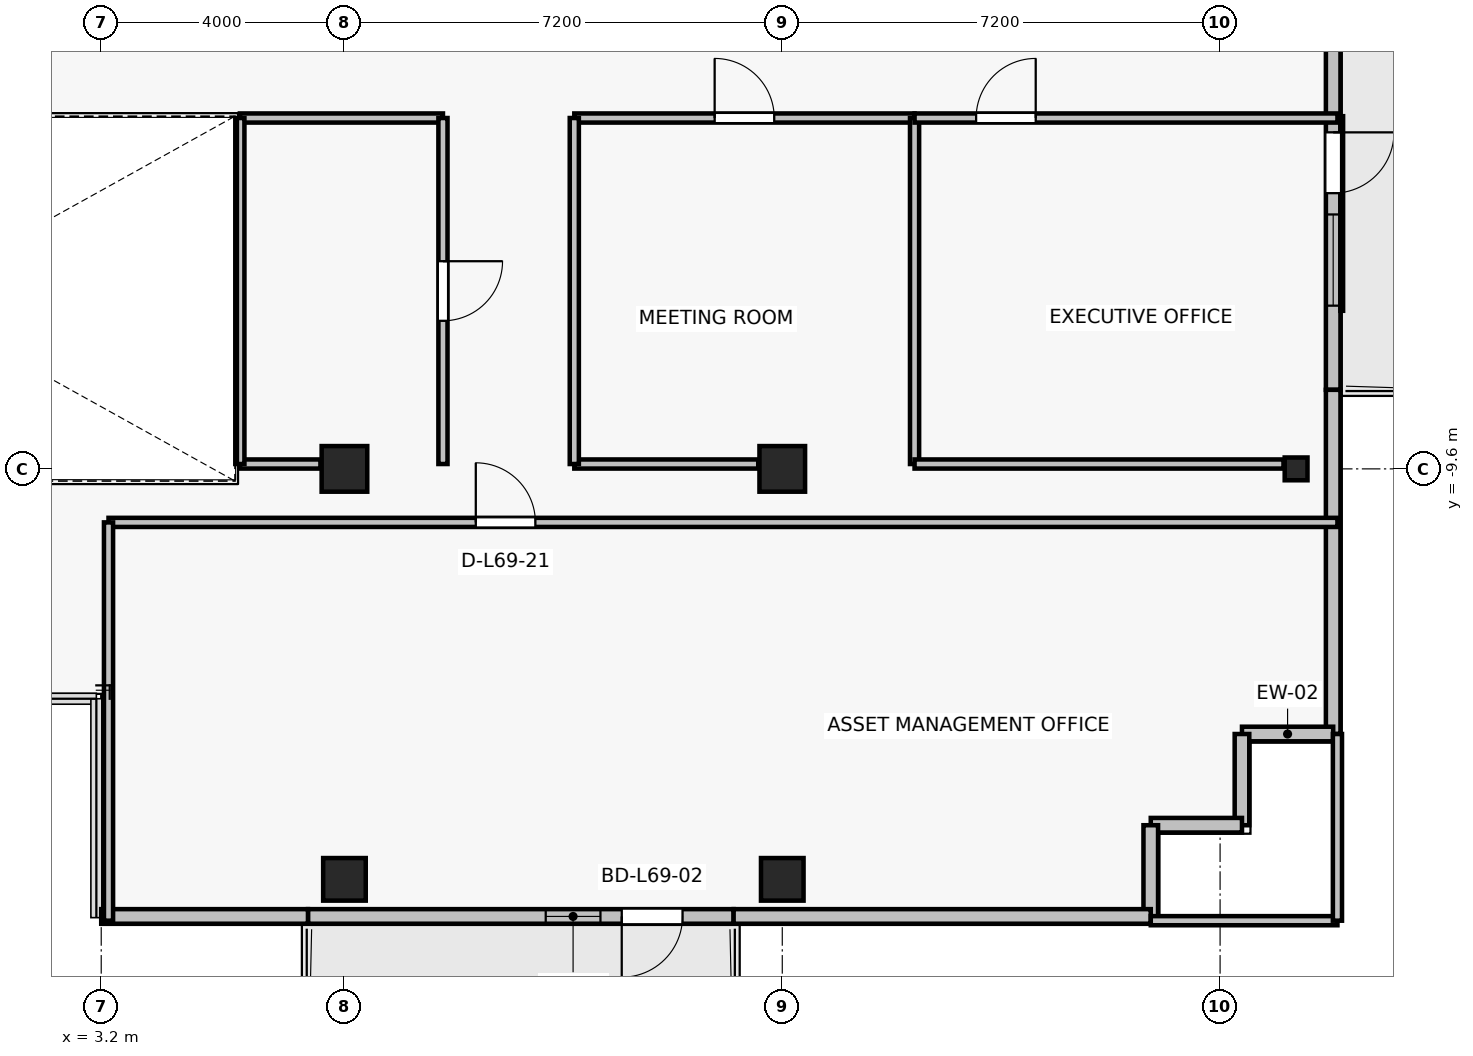
"""IFC4 building model, lengths in metres.
Left out: names, types, materials, properties, quantities, classifications, styles, units other than length and angle.
Written with IfcOpenShell. Run it as: python <this file> out.ifc"""

import sys

from ifc_helpers import new_model, si_unit, direction, frame, frame_2d, origin, origin_2d, place, context, subcontext, project, spatial, rectangle, i_section, extrude, source, transform, mapped, element, fill, save


model = new_model("IFC4")
c1 = context("Model", 3, precision=1e-05, world=origin(), true_north=direction((0.0, 1.0)))
c2 = subcontext(c1, "Body", "Model", "MODEL_VIEW")
j1 = project(units=[si_unit("LENGTHUNIT", "METRE"), si_unit("PLANEANGLEUNIT", "RADIAN")], contexts=[c1])
p1 = place(None, origin())
s1 = spatial("IfcSite", under=j1, at=p1, CompositionType="ELEMENT")
p2 = place(p1, origin())
s2 = spatial("IfcBuilding", under=s1, at=p2, CompositionType="ELEMENT")
p3 = place(p2, frame((0.0, 0.0, 245.2)))
s3 = spatial("IfcBuildingStorey", under=s2, at=p3, CompositionType="ELEMENT", Elevation=245.2)
for number, where, z_axis, x_axis in (
    (1, (7.2, -9.6, 0.0), (0.0, 0.0, 1.0), (1.0, 0.0, 0.0)),
    (2, (14.4, -9.6, 0.0), (0.0, 0.0, 1.0), (1.0, 0.0, 0.0)),
):
    element("IfcColumn", number, at=place(p3, frame(where, z_axis=z_axis, x_axis=x_axis)), inside=s3, PredefinedType="COLUMN", context=c2, shape_type="SweptSolid", body=[
        extrude(rectangle(XDim=0.75, YDim=0.75, at=origin_2d()), origin(), (0.0, 0.0, 1.0), 3.3),
    ])
for number, where, z_axis, x_axis in (
    (3, (7.2, -16.35, 0.0), (0.0, 0.0, 1.0), (1.0, 0.0, 0.0)),
    (4, (14.4, -16.35, 0.0), (0.0, 0.0, 1.0), (1.0, 0.0, 0.0)),
):
    element("IfcColumn", number, at=place(p3, frame(where, z_axis=z_axis, x_axis=x_axis)), inside=s3, PredefinedType="COLUMN", context=c2, shape_type="SweptSolid", body=[
        extrude(rectangle(XDim=0.7, YDim=0.7, at=origin_2d()), origin(), (0.0, 0.0, 1.0), 3.3),
    ])
p4 = place(p3, frame((22.85, -9.6, 0.0), z_axis=(0.0, 0.0, 1.0), x_axis=(1.0, 0.0, 0.0)))
e5 = element("IfcColumn", 5, at=p4, inside=s3, PredefinedType="COLUMN", context=c2, shape_type="SweptSolid", body=[
    extrude(i_section(OverallWidth=0.375, OverallDepth=0.375, WebThickness=0.017, FlangeThickness=0.027, FilletRadius=0.015, at=origin_2d()), origin(), (0.0, 0.0, 1.0), 3.3),
])
p5 = place(p3, frame((13.6, -16.96, 0.0), z_axis=(0.0, 0.0, 1.0), x_axis=(-1.0, 0.0, 0.0)))
e6 = element("IfcWall", 6, at=p5, inside=s3, PredefinedType="SOLIDWALL", context=c2, shape_type="SweptSolid", body=[
    extrude(rectangle(XDim=7.0, YDim=0.24, at=frame_2d((3.5, 0.0))), origin(), (0.0, 0.0, 1.0), 2.665),
])
p6 = place(p5, frame((0.84, 0.0, 0.0)))
e7 = element("IfcOpeningElement", 7, at=p6, cuts=e6, PredefinedType="OPENING", context=c2, shape_type="SweptSolid", body=[
    extrude(rectangle(XDim=1.0, YDim=2.2, at=frame_2d((0.5, 1.1))), frame((0.0, 0.13, 0.0), z_axis=(0.0, -1.0, 0.0), x_axis=(1.0, 0.0, 0.0)), (0.0, 0.0, 1.0), 0.26),
])
p7 = place(p5, frame((2.19, 0.0, 0.85)))
e8 = element("IfcOpeningElement", 8, at=p7, cuts=e6, PredefinedType="OPENING", context=c2, shape_type="SweptSolid", body=[
    extrude(rectangle(XDim=0.9, YDim=1.35, at=frame_2d((0.45, 0.675))), frame((0.0, 0.13, 0.0), z_axis=(0.0, -1.0, 0.0), x_axis=(1.0, 0.0, 0.0)), (0.0, 0.0, 1.0), 0.26),
])
p8 = place(p3, frame((23.46, -2.5, 0.0), z_axis=(0.0, 0.0, 1.0), x_axis=(0.0, -1.0, 0.0)))
e9 = element("IfcWall", 9, at=p8, inside=s3, PredefinedType="SOLIDWALL", context=c2, shape_type="SweptSolid", body=[
    extrude(rectangle(XDim=5.8, YDim=0.24, at=frame_2d((2.9, 0.0))), origin(), (0.0, 0.0, 1.0), 3.075),
])
p9 = place(p8, frame((1.566, 0.0, 0.0)))
e10 = element("IfcOpeningElement", 10, at=p9, cuts=e9, PredefinedType="OPENING", context=c2, shape_type="SweptSolid", body=[
    extrude(rectangle(XDim=1.0, YDim=2.2, at=frame_2d((0.5, 1.1))), frame((0.0, 0.13, 0.0), z_axis=(0.0, -1.0, 0.0), x_axis=(1.0, 0.0, 0.0)), (0.0, 0.0, 1.0), 0.26),
])
p10 = place(p8, frame((2.916, 0.0, 0.85)))
e11 = element("IfcOpeningElement", 11, at=p10, cuts=e9, PredefinedType="OPENING", context=c2, shape_type="SweptSolid", body=[
    extrude(rectangle(XDim=1.5, YDim=1.6, at=frame_2d((0.75, 0.8))), frame((0.0, 0.13, 0.0), z_axis=(0.0, -1.0, 0.0), x_axis=(1.0, 0.0, 0.0)), (0.0, 0.0, 1.0), 0.26),
])
p11 = place(p3, frame((23.46, -13.96, 0.0), z_axis=(0.0, 0.0, 1.0), x_axis=(0.0, 1.0, 0.0)))
e12 = element("IfcWall", 12, at=p11, inside=s3, PredefinedType="SOLIDWALL", context=c2, shape_type="SweptSolid", body=[
    extrude(rectangle(XDim=5.66, YDim=0.24, at=frame_2d((2.83, 0.0))), origin(), (0.0, 0.0, 1.0), 3.075),
])
for number, where, z_axis, x_axis in (
    (13, (21.96, -13.96, 0.0), (0.0, 0.0, 1.0), (1.0, 0.0, 0.0)),
    (14, (21.96, -15.46, 0.0), (0.0, 0.0, 1.0), (0.0, 1.0, 0.0)),
    (15, (20.46, -15.46, 0.0), (0.0, 0.0, 1.0), (1.0, 0.0, 0.0)),
    (16, (20.46, -16.96, 0.0), (0.0, 0.0, 1.0), (0.0, 1.0, 0.0)),
):
    element("IfcWall", number, at=place(p3, frame(where, z_axis=z_axis, x_axis=x_axis)), inside=s3, PredefinedType="SOLIDWALL", context=c2, shape_type="SweptSolid", body=[
        extrude(rectangle(XDim=1.5, YDim=0.24, at=frame_2d((0.75, 0.0))), origin(), (0.0, 0.0, 1.0), 3.075),
    ])
p12 = place(p3, frame((13.6, -16.96, 0.0), z_axis=(0.0, 0.0, 1.0), x_axis=(1.0, 0.0, 0.0)))
e17 = element("IfcWall", 17, at=p12, inside=s3, PredefinedType="SOLIDWALL", context=c2, shape_type="SweptSolid", body=[
    extrude(rectangle(XDim=6.86, YDim=0.24, at=frame_2d((3.43, 0.0))), origin(), (0.0, 0.0, 1.0), 2.665),
])
p13 = place(p3, frame((3.2, -16.96, 0.0), z_axis=(0.0, 0.0, 1.0), x_axis=(1.0, 0.0, 0.0)))
e18 = element("IfcWall", 18, at=p13, inside=s3, PredefinedType="SOLIDWALL", context=c2, shape_type="SweptSolid", body=[
    extrude(rectangle(XDim=3.4, YDim=0.24, at=frame_2d((1.7, 0.0))), origin(), (0.0, 0.0, 1.0), 3.075),
])
p14 = place(p3, frame((14.005, -9.52, 0.0), z_axis=(0.0, 0.0, 1.0), x_axis=(-1.0, 0.0, 0.0)))
e19 = element("IfcWall", 19, at=p14, inside=s3, PredefinedType="PARTITIONING", context=c2, shape_type="SweptSolid", body=[
    extrude(rectangle(XDim=3.025, YDim=0.15, at=frame_2d((1.512, 0.0))), origin(), (0.0, 0.0, 1.0), 2.615),
])
p15 = place(p3, frame((10.98, -3.83, 0.0), z_axis=(0.0, 0.0, 1.0), x_axis=(1.0, 0.0, 0.0)))
e20 = element("IfcWall", 20, at=p15, inside=s3, PredefinedType="PARTITIONING", context=c2, shape_type="SweptSolid", body=[
    extrude(rectangle(XDim=5.596, YDim=0.15, at=frame_2d((2.798, 0.0))), origin(), (0.0, 0.0, 1.0), 2.615),
])
p16 = place(p15, frame((2.308, 0.0, 0.0)))
e21 = element("IfcOpeningElement", 21, at=p16, cuts=e20, PredefinedType="OPENING", context=c2, shape_type="SweptSolid", body=[
    extrude(rectangle(XDim=0.98, YDim=2.15, at=frame_2d((0.49, 1.075))), frame((0.0, 0.085, 0.0), z_axis=(0.0, -1.0, 0.0), x_axis=(1.0, 0.0, 0.0)), (0.0, 0.0, 1.0), 0.17),
])
for number, where, z_axis, x_axis in (
    (22, (10.98, -9.52, 0.0), (0.0, 0.0, 1.0), (0.0, 1.0, 0.0)),
    (23, (16.576, -3.83, 0.0), (0.0, 0.0, 1.0), (0.0, -1.0, 0.0)),
):
    element("IfcWall", number, at=place(p3, frame(where, z_axis=z_axis, x_axis=x_axis)), inside=s3, PredefinedType="PARTITIONING", context=c2, shape_type="SweptSolid", body=[
        extrude(rectangle(XDim=5.69, YDim=0.15, at=frame_2d((2.845, 0.0))), origin(), (0.0, 0.0, 1.0), 2.615),
    ])
p17 = place(p3, frame((22.643, -9.52, 0.0), z_axis=(0.0, 0.0, 1.0), x_axis=(-1.0, 0.0, 0.0)))
e24 = element("IfcWall", 24, at=p17, inside=s3, PredefinedType="PARTITIONING", context=c2, shape_type="SweptSolid", body=[
    extrude(rectangle(XDim=6.067, YDim=0.15, at=frame_2d((3.033, 0.0))), origin(), (0.0, 0.0, 1.0), 2.615),
])
p18 = place(p3, frame((16.576, -3.83, 0.0), z_axis=(0.0, 0.0, 1.0), x_axis=(1.0, 0.0, 0.0)))
e25 = element("IfcWall", 25, at=p18, inside=s3, PredefinedType="PARTITIONING", context=c2, shape_type="SweptSolid", body=[
    extrude(rectangle(XDim=6.954, YDim=0.15, at=frame_2d((3.477, 0.0))), origin(), (0.0, 0.0, 1.0), 2.765),
])
p19 = place(p18, frame((1.012, 0.0, 0.0)))
e26 = element("IfcOpeningElement", 26, at=p19, cuts=e25, PredefinedType="OPENING", context=c2, shape_type="SweptSolid", body=[
    extrude(rectangle(XDim=0.98, YDim=2.15, at=frame_2d((0.49, 1.075))), frame((0.0, 0.085, 0.0), z_axis=(0.0, -1.0, 0.0), x_axis=(1.0, 0.0, 0.0)), (0.0, 0.0, 1.0), 0.17),
])
p20 = place(p3, frame((23.53, -17.03, 0.0), z_axis=(0.0, 0.0, 1.0), x_axis=(-1.0, 0.0, 0.0)))
e27 = element("IfcWall", 27, at=p20, inside=s3, PredefinedType="PARTITIONING", context=c2, shape_type="SweptSolid", body=[
    extrude(rectangle(XDim=3.07, YDim=0.15, at=frame_2d((1.535, 0.0))), origin(), (0.0, 0.0, 1.0), 2.665),
])
p21 = place(p3, frame((3.32, -10.48, 0.0), z_axis=(0.0, 0.0, 1.0), x_axis=(1.0, 0.0, 0.0)))
e28 = element("IfcWall", 28, at=p21, inside=s3, PredefinedType="PARTITIONING", context=c2, shape_type="SweptSolid", body=[
    extrude(rectangle(XDim=20.21, YDim=0.15, at=frame_2d((10.105, 0.0))), origin(), (0.0, 0.0, 1.0), 2.615),
])
p22 = place(p21, frame((6.04, 0.0, 0.0)))
e29 = element("IfcOpeningElement", 29, at=p22, cuts=e28, PredefinedType="OPENING", context=c2, shape_type="SweptSolid", body=[
    extrude(rectangle(XDim=0.98, YDim=2.15, at=frame_2d((0.49, 1.075))), frame((0.0, 0.085, 0.0), z_axis=(0.0, -1.0, 0.0), x_axis=(1.0, 0.0, 0.0)), (0.0, 0.0, 1.0), 0.17),
])
p23 = place(p3, frame((3.32, -17.03, 0.0), z_axis=(0.0, 0.0, 1.0), x_axis=(0.0, 1.0, 0.0)))
e30 = element("IfcWall", 30, at=p23, inside=s3, PredefinedType="PARTITIONING", context=c2, shape_type="SweptSolid", body=[
    extrude(rectangle(XDim=6.55, YDim=0.15, at=frame_2d((3.275, 0.0))), origin(), (0.0, 0.0, 1.0), 2.615),
])
p24 = place(p3, frame((23.53, -13.96, 0.0), z_axis=(0.0, 0.0, 1.0), x_axis=(0.0, -1.0, 0.0)))
e31 = element("IfcWall", 31, at=p24, inside=s3, PredefinedType="PARTITIONING", context=c2, shape_type="SweptSolid", body=[
    extrude(rectangle(XDim=3.07, YDim=0.15, at=frame_2d((1.535, 0.0))), origin(), (0.0, 0.0, 1.0), 3.075),
])
p25 = place(p3, frame((6.805, -9.52, 0.0), z_axis=(0.0, 0.0, 1.0), x_axis=(-1.0, 0.0, 0.0)))
e32 = element("IfcWall", 32, at=p25, inside=s3, PredefinedType="PARTITIONING", context=c2, shape_type="SweptSolid", body=[
    extrude(rectangle(XDim=1.325, YDim=0.15, at=frame_2d((0.663, 0.0))), origin(), (0.0, 0.0, 1.0), 2.615),
])
p26 = place(p3, frame((5.48, -3.83, 0.0), z_axis=(0.0, 0.0, 1.0), x_axis=(1.0, 0.0, 0.0)))
e33 = element("IfcWall", 33, at=p26, inside=s3, PredefinedType="PARTITIONING", context=c2, shape_type="SweptSolid", body=[
    extrude(rectangle(XDim=3.34, YDim=0.15, at=frame_2d((1.67, 0.0))), origin(), (0.0, 0.0, 1.0), 2.615),
])
p27 = place(p3, frame((5.48, -9.52, 0.0), z_axis=(0.0, 0.0, 1.0), x_axis=(0.0, 1.0, 0.0)))
e34 = element("IfcWall", 34, at=p27, inside=s3, PredefinedType="PARTITIONING", context=c2, shape_type="SweptSolid", body=[
    extrude(rectangle(XDim=5.69, YDim=0.15, at=frame_2d((2.845, 0.0))), origin(), (0.0, 0.0, 1.0), 2.615),
])
p28 = place(p3, frame((8.82, -3.83, 0.0), z_axis=(0.0, 0.0, 1.0), x_axis=(0.0, -1.0, 0.0)))
e35 = element("IfcWall", 35, at=p28, inside=s3, PredefinedType="PARTITIONING", context=c2, shape_type="SweptSolid", body=[
    extrude(rectangle(XDim=5.69, YDim=0.15, at=frame_2d((2.845, 0.0))), origin(), (0.0, 0.0, 1.0), 2.615),
])
p29 = place(p28, frame((2.355, 0.0, 0.0)))
e36 = element("IfcOpeningElement", 36, at=p29, cuts=e35, PredefinedType="OPENING", context=c2, shape_type="SweptSolid", body=[
    extrude(rectangle(XDim=0.98, YDim=2.15, at=frame_2d((0.49, 1.075))), frame((0.0, 0.085, 0.0), z_axis=(0.0, -1.0, 0.0), x_axis=(1.0, 0.0, 0.0)), (0.0, 0.0, 1.0), 0.17),
])
m1 = source(origin(), c2, "Body", "SweptSolid", [
    extrude(rectangle(XDim=1.0, YDim=2.2, at=frame_2d((0.5, 1.1))), frame((0.0, 0.025, 0.0), z_axis=(0.0, -1.0, 0.0), x_axis=(1.0, 0.0, 0.0)), (0.0, 0.0, 1.0), 0.05),
])
p30 = place(p6, origin())
e37 = element("IfcDoor", 37, at=p30, inside=s3, OperationType="SINGLE_SWING_RIGHT", PredefinedType="DOOR", context=c2, shape_type="MappedRepresentation", body=[
    mapped(m1, transform((0.0, 0.0, 0.0), x_axis=(1.0, 0.0, 0.0), y_axis=(0.0, 1.0, 0.0), z_axis=(0.0, 0.0, 1.0), scale=1.0)),
])
fill(e7, e37)
m2 = source(origin(), c2, "Body", "SweptSolid", [
    extrude(rectangle(XDim=0.9, YDim=1.35, at=frame_2d((0.45, 0.675))), frame((0.0, 0.03, 0.0), z_axis=(0.0, -1.0, 0.0), x_axis=(1.0, 0.0, 0.0)), (0.0, 0.0, 1.0), 0.06),
])
p31 = place(p7, origin())
e38 = element("IfcWindow", 38, at=p31, inside=s3, PartitioningType="SINGLE_PANEL", PredefinedType="WINDOW", context=c2, shape_type="MappedRepresentation", body=[
    mapped(m2, transform((0.0, 0.0, 0.0), x_axis=(1.0, 0.0, 0.0), y_axis=(0.0, 1.0, 0.0), z_axis=(0.0, 0.0, 1.0), scale=1.0)),
])
fill(e8, e38)
p32 = place(p9, origin())
e39 = element("IfcDoor", 39, at=p32, inside=s3, OperationType="SINGLE_SWING_LEFT", PredefinedType="DOOR", context=c2, shape_type="MappedRepresentation", body=[
    mapped(m1, transform((0.0, 0.0, 0.0), x_axis=(1.0, 0.0, 0.0), y_axis=(0.0, 1.0, 0.0), z_axis=(0.0, 0.0, 1.0), scale=1.0)),
])
fill(e10, e39)
m3 = source(origin(), c2, "Body", "SweptSolid", [
    extrude(rectangle(XDim=1.5, YDim=1.6, at=frame_2d((0.75, 0.8))), frame((0.0, 0.03, 0.0), z_axis=(0.0, -1.0, 0.0), x_axis=(1.0, 0.0, 0.0)), (0.0, 0.0, 1.0), 0.06),
])
p33 = place(p10, origin())
e40 = element("IfcWindow", 40, at=p33, inside=s3, PartitioningType="SINGLE_PANEL", PredefinedType="WINDOW", context=c2, shape_type="MappedRepresentation", body=[
    mapped(m3, transform((0.0, 0.0, 0.0), x_axis=(1.0, 0.0, 0.0), y_axis=(0.0, 1.0, 0.0), z_axis=(0.0, 0.0, 1.0), scale=1.0)),
])
fill(e11, e40)
m4 = source(origin(), c2, "Body", "SweptSolid", [
    extrude(rectangle(XDim=0.98, YDim=2.15, at=frame_2d((0.49, 1.075))), frame((0.0, 0.025, 0.0), z_axis=(0.0, -1.0, 0.0), x_axis=(1.0, 0.0, 0.0)), (0.0, 0.0, 1.0), 0.05),
])
p34 = place(p16, origin())
e41 = element("IfcDoor", 41, at=p34, inside=s3, OperationType="SINGLE_SWING_LEFT", PredefinedType="DOOR", context=c2, shape_type="MappedRepresentation", body=[
    mapped(m4, transform((0.0, 0.0, 0.0), x_axis=(1.0, 0.0, 0.0), y_axis=(0.0, 1.0, 0.0), z_axis=(0.0, 0.0, 1.0), scale=1.0)),
])
fill(e21, e41)
p35 = place(p19, origin())
e42 = element("IfcDoor", 42, at=p35, inside=s3, OperationType="SINGLE_SWING_RIGHT", PredefinedType="DOOR", context=c2, shape_type="MappedRepresentation", body=[
    mapped(m4, transform((0.0, 0.0, 0.0), x_axis=(1.0, 0.0, 0.0), y_axis=(0.0, 1.0, 0.0), z_axis=(0.0, 0.0, 1.0), scale=1.0)),
])
fill(e26, e42)
p36 = place(p22, origin())
e43 = element("IfcDoor", 43, at=p36, inside=s3, OperationType="SINGLE_SWING_LEFT", PredefinedType="DOOR", context=c2, shape_type="MappedRepresentation", body=[
    mapped(m4, transform((0.0, 0.0, 0.0), x_axis=(1.0, 0.0, 0.0), y_axis=(0.0, 1.0, 0.0), z_axis=(0.0, 0.0, 1.0), scale=1.0)),
])
fill(e29, e43)
p37 = place(p29, origin())
e44 = element("IfcDoor", 44, at=p37, inside=s3, OperationType="SINGLE_SWING_LEFT", PredefinedType="DOOR", context=c2, shape_type="MappedRepresentation", body=[
    mapped(m4, transform((0.0, 0.0, 0.0), x_axis=(1.0, 0.0, 0.0), y_axis=(0.0, 1.0, 0.0), z_axis=(0.0, 0.0, 1.0), scale=1.0)),
])
fill(e36, e44)
save(model, sys.argv[1])
